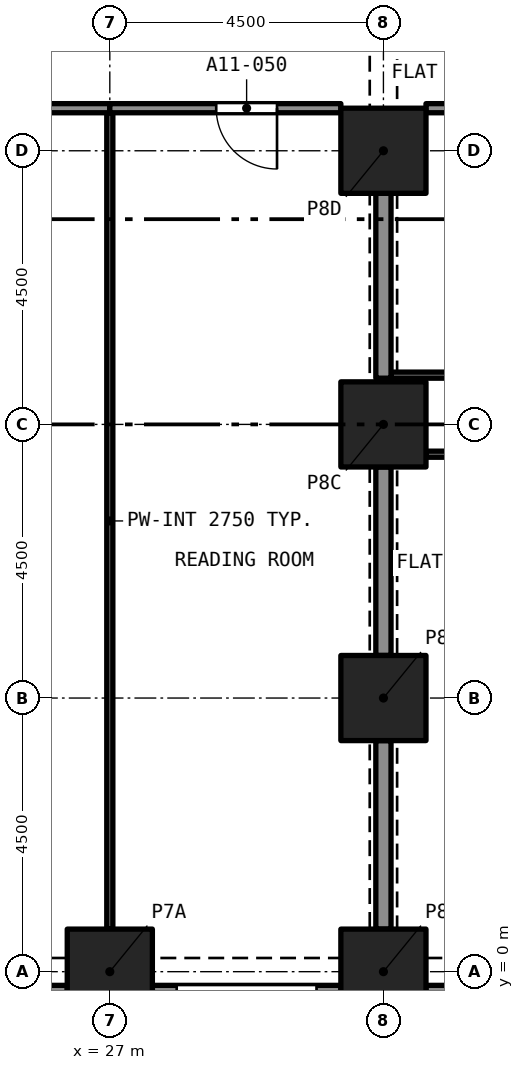
"""IFC4 building model, lengths in metres.
Left out: names, types, materials, properties, quantities, classifications, styles, units other than length and angle.
Written with IfcOpenShell. Run it as: python <this file> out.ifc"""

import sys

from ifc_helpers import new_model, si_unit, direction, frame, frame_2d, origin, origin_2d, place, context, subcontext, project, spatial, rectangle, extrude, element, fill, save


model = new_model("IFC4")
c1 = context("Model", 3, precision=1e-05, world=origin(), true_north=direction((0.0, 1.0)))
c2 = subcontext(c1, "Body", "Model", "MODEL_VIEW")
j1 = project(units=[si_unit("LENGTHUNIT", "METRE"), si_unit("PLANEANGLEUNIT", "RADIAN")], contexts=[c1])
p1 = place(None, origin())
s1 = spatial("IfcSite", under=j1, at=p1, CompositionType="ELEMENT")
p2 = place(p1, origin())
s2 = spatial("IfcBuilding", under=s1, at=p2, CompositionType="ELEMENT")
p3 = place(p2, frame((0.0, 0.0, 46.4)))
s3 = spatial("IfcBuildingStorey", under=s2, at=p3, CompositionType="ELEMENT", Elevation=46.4)
for number, where, z_axis, x_axis in (
    (1, (27.0, 0.0, 0.0), (0.0, 0.0, 1.0), (1.0, 0.0, 0.0)),
    (2, (31.5, 0.0, 0.0), (0.0, 0.0, 1.0), (1.0, 0.0, 0.0)),
    (3, (31.5, 4.5, 0.0), (0.0, 0.0, 1.0), (1.0, 0.0, 0.0)),
    (4, (31.5, 9.0, 0.0), (0.0, 0.0, 1.0), (1.0, 0.0, 0.0)),
    (5, (31.5, 13.5, 0.0), (0.0, 0.0, 1.0), (1.0, 0.0, 0.0)),
):
    element("IfcColumn", number, at=place(p3, frame(where, z_axis=z_axis, x_axis=x_axis)), inside=s3, PredefinedType="COLUMN", context=c2, shape_type="SweptSolid", body=[
        extrude(rectangle(XDim=1.4, YDim=1.4, at=origin_2d()), origin(), (0.0, 0.0, 1.0), 3.2),
    ])
p4 = place(p3, frame((26.3, -0.375, 0.0), z_axis=(0.0, 0.0, 1.0), x_axis=(-1.0, 0.0, 0.0)))
e6 = element("IfcWall", 6, at=p4, inside=s3, PredefinedType="SOLIDWALL", context=c2, shape_type="SweptSolid", body=[
    extrude(rectangle(XDim=3.1, YDim=0.3, at=frame_2d((1.55, 0.0))), origin(), (0.0, 0.0, 1.0), 3.2),
])
p5 = place(p4, frame((0.4, 0.0, 0.45)))
e7 = element("IfcOpeningElement", 7, at=p5, cuts=e6, PredefinedType="OPENING", context=c2, shape_type="SweptSolid", body=[
    extrude(rectangle(XDim=2.3, YDim=1.95, at=frame_2d((1.15, 0.975))), frame((0.0, 0.16, 0.0), z_axis=(0.0, -1.0, 0.0), x_axis=(1.0, 0.0, 0.0)), (0.0, 0.0, 1.0), 0.32),
])
p6 = place(p3, frame((30.8, -0.375, 0.0), z_axis=(0.0, 0.0, 1.0), x_axis=(-1.0, 0.0, 0.0)))
e8 = element("IfcWall", 8, at=p6, inside=s3, PredefinedType="SOLIDWALL", context=c2, shape_type="SweptSolid", body=[
    extrude(rectangle(XDim=3.1, YDim=0.3, at=frame_2d((1.55, 0.0))), origin(), (0.0, 0.0, 1.0), 3.2),
])
p7 = place(p6, frame((0.4, 0.0, 0.45)))
e9 = element("IfcOpeningElement", 9, at=p7, cuts=e8, PredefinedType="OPENING", context=c2, shape_type="SweptSolid", body=[
    extrude(rectangle(XDim=2.3, YDim=1.95, at=frame_2d((1.15, 0.975))), frame((0.0, 0.16, 0.0), z_axis=(0.0, -1.0, 0.0), x_axis=(1.0, 0.0, 0.0)), (0.0, 0.0, 1.0), 0.32),
])
p8 = place(p3, frame((35.3, -0.375, 0.0), z_axis=(0.0, 0.0, 1.0), x_axis=(-1.0, 0.0, 0.0)))
e10 = element("IfcWall", 10, at=p8, inside=s3, PredefinedType="SOLIDWALL", context=c2, shape_type="SweptSolid", body=[
    extrude(rectangle(XDim=3.1, YDim=0.3, at=frame_2d((1.55, 0.0))), origin(), (0.0, 0.0, 1.0), 3.2),
])
p9 = place(p8, frame((0.4, 0.0, 0.45)))
e11 = element("IfcOpeningElement", 11, at=p9, cuts=e10, PredefinedType="OPENING", context=c2, shape_type="SweptSolid", body=[
    extrude(rectangle(XDim=2.3, YDim=1.95, at=frame_2d((1.15, 0.975))), frame((0.0, 0.16, 0.0), z_axis=(0.0, -1.0, 0.0), x_axis=(1.0, 0.0, 0.0)), (0.0, 0.0, 1.0), 0.32),
])
p10 = place(p3, frame((31.625, 9.81, 0.0), z_axis=(0.0, 0.0, 1.0), x_axis=(1.0, 0.0, 0.0)))
e12 = element("IfcWall", 12, at=p10, inside=s3, PredefinedType="PARTITIONING", context=c2, shape_type="SweptSolid", body=[
    extrude(rectangle(XDim=3.39, YDim=0.1, at=frame_2d((1.695, 0.0))), origin(), (0.0, 0.0, 1.0), 2.9),
])
p11 = place(p10, frame((1.183, 0.0, 0.0)))
e13 = element("IfcOpeningElement", 13, at=p11, cuts=e12, PredefinedType="OPENING", context=c2, shape_type="SweptSolid", body=[
    extrude(rectangle(XDim=0.9, YDim=2.1, at=frame_2d((0.45, 1.05))), frame((0.0, 0.06, 0.0), z_axis=(0.0, -1.0, 0.0), x_axis=(1.0, 0.0, 0.0)), (0.0, 0.0, 1.0), 0.12),
])
p12 = place(p3, frame((36.0, 8.51, 0.0), z_axis=(0.0, 0.0, 1.0), x_axis=(-1.0, 0.0, 0.0)))
e14 = element("IfcWall", 14, at=p12, inside=s3, PredefinedType="PARTITIONING", context=c2, shape_type="SweptSolid", body=[
    extrude(rectangle(XDim=3.8, YDim=0.1, at=frame_2d((1.9, 0.0))), origin(), (0.0, 0.0, 1.0), 2.9),
])
p13 = place(p12, frame((1.75, 0.0, 0.0)))
e15 = element("IfcOpeningElement", 15, at=p13, cuts=e14, PredefinedType="OPENING", context=c2, shape_type="SweptSolid", body=[
    extrude(rectangle(XDim=1.0, YDim=2.1, at=frame_2d((0.5, 1.05))), frame((0.0, 0.06, 0.0), z_axis=(0.0, -1.0, 0.0), x_axis=(1.0, 0.0, 0.0)), (0.0, 0.0, 1.0), 0.12),
])
p14 = place(p3, frame((31.5, 9.76, 0.0), z_axis=(0.0, 0.0, 1.0), x_axis=(0.0, 1.0, 0.0)))
e16 = element("IfcWall", 16, at=p14, inside=s3, PredefinedType="PARTITIONING", context=c2, shape_type="SweptSolid", body=[
    extrude(rectangle(XDim=3.04, YDim=0.25, at=frame_2d((1.52, 0.0))), origin(), (0.0, 0.0, 1.0), 2.38),
])
p15 = place(p3, frame((32.2, 14.2, 0.0), z_axis=(0.0, 0.0, 1.0), x_axis=(1.0, 0.0, 0.0)))
e17 = element("IfcWall", 17, at=p15, inside=s3, PredefinedType="PARTITIONING", context=c2, shape_type="SweptSolid", body=[
    extrude(rectangle(XDim=5.3, YDim=0.15, at=frame_2d((2.65, 0.0))), origin(), (0.0, 0.0, 1.0), 2.9),
])
for number, where, z_axis, x_axis in (
    (18, (31.5, 0.7, 0.0), (0.0, 0.0, 1.0), (0.0, 1.0, 0.0)),
    (19, (31.5, 5.2, 0.0), (0.0, 0.0, 1.0), (0.0, 1.0, 0.0)),
):
    element("IfcWall", number, at=place(p3, frame(where, z_axis=z_axis, x_axis=x_axis)), inside=s3, PredefinedType="PARTITIONING", context=c2, shape_type="SweptSolid", body=[
        extrude(rectangle(XDim=3.1, YDim=0.25, at=frame_2d((1.55, 0.0))), origin(), (0.0, 0.0, 1.0), 2.38),
    ])
p16 = place(p3, frame((27.0, 0.7, 0.0), z_axis=(0.0, 0.0, 1.0), x_axis=(0.0, 1.0, 0.0)))
e20 = element("IfcWall", 20, at=p16, inside=s3, PredefinedType="PARTITIONING", context=c2, shape_type="SweptSolid", body=[
    extrude(rectangle(XDim=13.425, YDim=0.1, at=frame_2d((6.712, 0.0))), origin(), (0.0, 0.0, 1.0), 2.75),
])
p17 = place(p3, frame((27.0, 14.2, 0.0), z_axis=(0.0, 0.0, 1.0), x_axis=(-1.0, 0.0, 0.0)))
e21 = element("IfcWall", 21, at=p17, inside=s3, PredefinedType="PARTITIONING", context=c2, shape_type="SweptSolid", body=[
    extrude(rectangle(XDim=8.3, YDim=0.15, at=frame_2d((4.15, 0.0))), origin(), (0.0, 0.0, 1.0), 2.75),
])
p18 = place(p17, frame((4.0, 0.0, 0.0)))
e22 = element("IfcOpeningElement", 22, at=p18, cuts=e21, PredefinedType="OPENING", context=c2, shape_type="SweptSolid", body=[
    extrude(rectangle(XDim=1.0, YDim=2.1, at=frame_2d((0.5, 1.05))), frame((0.0, 0.085, 0.0), z_axis=(0.0, -1.0, 0.0), x_axis=(1.0, 0.0, 0.0)), (0.0, 0.0, 1.0), 0.17),
])
p19 = place(p3, frame((30.8, 14.2, 0.0), z_axis=(0.0, 0.0, 1.0), x_axis=(-1.0, 0.0, 0.0)))
e23 = element("IfcWall", 23, at=p19, inside=s3, PredefinedType="PARTITIONING", context=c2, shape_type="SweptSolid", body=[
    extrude(rectangle(XDim=3.8, YDim=0.15, at=frame_2d((1.9, 0.0))), origin(), (0.0, 0.0, 1.0), 2.75),
])
p20 = place(p19, frame((1.05, 0.0, 0.0)))
e24 = element("IfcOpeningElement", 24, at=p20, cuts=e23, PredefinedType="OPENING", context=c2, shape_type="SweptSolid", body=[
    extrude(rectangle(XDim=1.0, YDim=2.1, at=frame_2d((0.5, 1.05))), frame((0.0, 0.085, 0.0), z_axis=(0.0, -1.0, 0.0), x_axis=(1.0, 0.0, 0.0)), (0.0, 0.0, 1.0), 0.17),
])
p21 = place(p20, origin())
e25 = element("IfcDoor", 25, at=p21, inside=s3, OperationType="SINGLE_SWING_LEFT", PredefinedType="DOOR", context=c2, shape_type="SweptSolid", body=[
    extrude(rectangle(XDim=1.0, YDim=2.1, at=frame_2d((0.5, 1.05))), frame((0.0, 0.025, 0.0), z_axis=(0.0, -1.0, 0.0), x_axis=(1.0, 0.0, 0.0)), (0.0, 0.0, 1.0), 0.05),
])
fill(e24, e25)
save(model, sys.argv[1])
